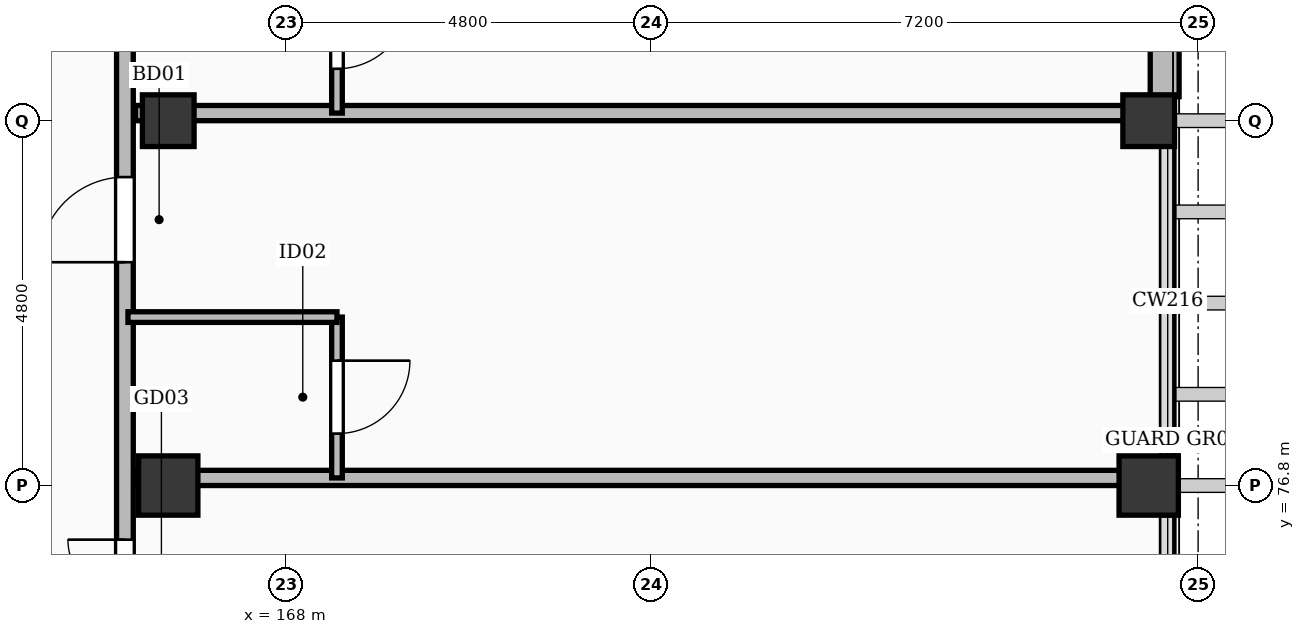
"""IFC4 building model, lengths in metres.
Left out: names, types, materials, properties, quantities, classifications, styles, units other than length and angle.
Written with IfcOpenShell. Run it as: python <this file> out.ifc"""

import sys

from ifc_helpers import new_model, si_unit, direction, frame, frame_2d, origin, origin_2d, place, context, subcontext, project, spatial, rectangle, extrude, element, fill, save


model = new_model("IFC4")
c1 = context("Model", 3, precision=1e-05, world=origin(), true_north=direction((0.0, 1.0)))
c2 = subcontext(c1, "Body", "Model", "MODEL_VIEW")
j1 = project(units=[si_unit("LENGTHUNIT", "METRE"), si_unit("PLANEANGLEUNIT", "RADIAN")], contexts=[c1])
p1 = place(None, origin())
s1 = spatial("IfcSite", under=j1, at=p1, CompositionType="ELEMENT")
p2 = place(p1, origin())
s2 = spatial("IfcBuilding", under=s1, at=p2, CompositionType="ELEMENT")
p3 = place(p2, frame((0.0, 0.0, 24.6)))
s3 = spatial("IfcBuildingStorey", under=s2, at=p3, CompositionType="ELEMENT", Elevation=24.6)
for number, where, z_axis, x_axis in (
    (1, (166.45, 76.8, 0.0), (0.0, 0.0, 1.0), (1.0, 0.0, 0.0)),
    (2, (179.35, 76.8, 0.0), (0.0, 0.0, 1.0), (1.0, 0.0, 0.0)),
):
    element("IfcColumn", number, at=place(p3, frame(where, z_axis=z_axis, x_axis=x_axis)), inside=s3, PredefinedType="COLUMN", context=c2, shape_type="SweptSolid", body=[
        extrude(rectangle(XDim=0.78, YDim=0.78, at=origin_2d()), origin(), (0.0, 0.0, 1.0), 3.6),
    ])
for number, where, z_axis, x_axis in (
    (3, (166.45, 81.6, 0.0), (0.0, 0.0, 1.0), (1.0, 0.0, 0.0)),
    (4, (179.35, 81.6, 0.0), (0.0, 0.0, 1.0), (1.0, 0.0, 0.0)),
):
    element("IfcColumn", number, at=place(p3, frame(where, z_axis=z_axis, x_axis=x_axis)), inside=s3, PredefinedType="COLUMN", context=c2, shape_type="SweptSolid", body=[
        extrude(rectangle(XDim=0.68, YDim=0.68, at=origin_2d()), origin(), (0.0, 0.0, 1.0), 3.6),
    ])
p4 = place(p3, frame((179.56, 86.035, 0.0), z_axis=(0.0, 0.0, 1.0), x_axis=(0.0, -1.0, 0.0)))
e5 = element("IfcWall", 5, at=p4, inside=s3, PredefinedType="SOLIDWALL", context=c2, shape_type="SweptSolid", body=[
    extrude(rectangle(XDim=4.12, YDim=0.38, at=frame_2d((2.06, 0.0))), origin(), (0.0, 0.0, 1.0), 2.582),
])
p5 = place(p4, frame((1.235, 0.0, 0.55)))
e6 = element("IfcOpeningElement", 6, at=p5, cuts=e5, PredefinedType="OPENING", context=c2, shape_type="SweptSolid", body=[
    extrude(rectangle(XDim=1.65, YDim=1.75, at=frame_2d((0.825, 0.875))), frame((0.0, 0.202, 0.0), z_axis=(0.0, -1.0, 0.0), x_axis=(1.0, 0.0, 0.0)), (0.0, 0.0, 1.0), 0.404),
])
p6 = place(p3, frame((165.88, 65.4, 0.0), z_axis=(0.0, 0.0, 1.0), x_axis=(0.0, 1.0, 0.0)))
e7 = element("IfcWall", 7, at=p6, inside=s3, PredefinedType="PARTITIONING", context=c2, shape_type="SweptSolid", body=[
    extrude(rectangle(XDim=60.25, YDim=0.22, at=frame_2d((30.125, 0.0))), origin(), (0.0, 0.0, 1.0), 2.582),
])
p7 = place(p6, frame((4.738, 0.0, 0.0)))
e8 = element("IfcOpeningElement", 8, at=p7, cuts=e7, PredefinedType="OPENING", context=c2, shape_type="SweptSolid", body=[
    extrude(rectangle(XDim=1.02, YDim=2.2, at=frame_2d((0.51, 1.1))), frame((0.0, 0.122, 0.0), z_axis=(0.0, -1.0, 0.0), x_axis=(1.0, 0.0, 0.0)), (0.0, 0.0, 1.0), 0.244),
])
p8 = place(p6, frame((9.188, 0.0, 0.0)))
e9 = element("IfcOpeningElement", 9, at=p8, cuts=e7, PredefinedType="OPENING", context=c2, shape_type="SweptSolid", body=[
    extrude(rectangle(XDim=1.5, YDim=2.3, at=frame_2d((0.75, 1.15))), frame((0.0, 0.122, 0.0), z_axis=(0.0, -1.0, 0.0), x_axis=(1.0, 0.0, 0.0)), (0.0, 0.0, 1.0), 0.244),
])
p9 = place(p6, frame((14.338, 0.0, 0.0)))
e10 = element("IfcOpeningElement", 10, at=p9, cuts=e7, PredefinedType="OPENING", context=c2, shape_type="SweptSolid", body=[
    extrude(rectangle(XDim=1.12, YDim=2.15, at=frame_2d((0.56, 1.075))), frame((0.0, 0.122, 0.0), z_axis=(0.0, -1.0, 0.0), x_axis=(1.0, 0.0, 0.0)), (0.0, 0.0, 1.0), 0.244),
])
p10 = place(p6, frame((18.788, 0.0, 0.0)))
e11 = element("IfcOpeningElement", 11, at=p10, cuts=e7, PredefinedType="OPENING", context=c2, shape_type="SweptSolid", body=[
    extrude(rectangle(XDim=1.28, YDim=2.16, at=frame_2d((0.64, 1.08))), frame((0.0, 0.122, 0.0), z_axis=(0.0, -1.0, 0.0), x_axis=(1.0, 0.0, 0.0)), (0.0, 0.0, 1.0), 0.244),
])
p11 = place(p6, frame((23.938, 0.0, 0.0)))
e12 = element("IfcOpeningElement", 12, at=p11, cuts=e7, PredefinedType="OPENING", context=c2, shape_type="SweptSolid", body=[
    extrude(rectangle(XDim=1.05, YDim=2.18, at=frame_2d((0.525, 1.09))), frame((0.0, 0.122, 0.0), z_axis=(0.0, -1.0, 0.0), x_axis=(1.0, 0.0, 0.0)), (0.0, 0.0, 1.0), 0.244),
])
p12 = place(p6, frame((28.738, 0.0, 0.0)))
e13 = element("IfcOpeningElement", 13, at=p12, cuts=e7, PredefinedType="OPENING", context=c2, shape_type="SweptSolid", body=[
    extrude(rectangle(XDim=1.08, YDim=2.25, at=frame_2d((0.54, 1.125))), frame((0.0, 0.122, 0.0), z_axis=(0.0, -1.0, 0.0), x_axis=(1.0, 0.0, 0.0)), (0.0, 0.0, 1.0), 0.244),
])
p13 = place(p6, frame((33.538, 0.0, 0.0)))
e14 = element("IfcOpeningElement", 14, at=p13, cuts=e7, PredefinedType="OPENING", context=c2, shape_type="SweptSolid", body=[
    extrude(rectangle(XDim=1.02, YDim=2.2, at=frame_2d((0.51, 1.1))), frame((0.0, 0.122, 0.0), z_axis=(0.0, -1.0, 0.0), x_axis=(1.0, 0.0, 0.0)), (0.0, 0.0, 1.0), 0.244),
])
p14 = place(p6, frame((37.988, 0.0, 0.0)))
e15 = element("IfcOpeningElement", 15, at=p14, cuts=e7, PredefinedType="OPENING", context=c2, shape_type="SweptSolid", body=[
    extrude(rectangle(XDim=1.5, YDim=2.3, at=frame_2d((0.75, 1.15))), frame((0.0, 0.122, 0.0), z_axis=(0.0, -1.0, 0.0), x_axis=(1.0, 0.0, 0.0)), (0.0, 0.0, 1.0), 0.244),
])
p15 = place(p6, frame((43.138, 0.0, 0.0)))
e16 = element("IfcOpeningElement", 16, at=p15, cuts=e7, PredefinedType="OPENING", context=c2, shape_type="SweptSolid", body=[
    extrude(rectangle(XDim=1.12, YDim=2.15, at=frame_2d((0.56, 1.075))), frame((0.0, 0.122, 0.0), z_axis=(0.0, -1.0, 0.0), x_axis=(1.0, 0.0, 0.0)), (0.0, 0.0, 1.0), 0.244),
])
p16 = place(p6, frame((47.588, 0.0, 0.0)))
e17 = element("IfcOpeningElement", 17, at=p16, cuts=e7, PredefinedType="OPENING", context=c2, shape_type="SweptSolid", body=[
    extrude(rectangle(XDim=1.28, YDim=2.16, at=frame_2d((0.64, 1.08))), frame((0.0, 0.122, 0.0), z_axis=(0.0, -1.0, 0.0), x_axis=(1.0, 0.0, 0.0)), (0.0, 0.0, 1.0), 0.244),
])
p17 = place(p6, frame((52.738, 0.0, 0.0)))
e18 = element("IfcOpeningElement", 18, at=p17, cuts=e7, PredefinedType="OPENING", context=c2, shape_type="SweptSolid", body=[
    extrude(rectangle(XDim=1.05, YDim=2.18, at=frame_2d((0.525, 1.09))), frame((0.0, 0.122, 0.0), z_axis=(0.0, -1.0, 0.0), x_axis=(1.0, 0.0, 0.0)), (0.0, 0.0, 1.0), 0.244),
])
p18 = place(p6, frame((57.538, 0.0, 0.0)))
e19 = element("IfcOpeningElement", 19, at=p18, cuts=e7, PredefinedType="OPENING", context=c2, shape_type="SweptSolid", body=[
    extrude(rectangle(XDim=1.08, YDim=2.25, at=frame_2d((0.54, 1.125))), frame((0.0, 0.122, 0.0), z_axis=(0.0, -1.0, 0.0), x_axis=(1.0, 0.0, 0.0)), (0.0, 0.0, 1.0), 0.244),
])
p19 = place(p3, frame((166.02, 76.9, 0.0), z_axis=(0.0, 0.0, 1.0), x_axis=(1.0, 0.0, 0.0)))
e20 = element("IfcWall", 20, at=p19, inside=s3, PredefinedType="PARTITIONING", context=c2, shape_type="SweptSolid", body=[
    extrude(rectangle(XDim=13.23, YDim=0.2, at=frame_2d((6.615, 0.0))), origin(), (0.0, 0.0, 1.0), 2.582),
])
p20 = place(p3, frame((168.67, 76.9, 0.0), z_axis=(0.0, 0.0, 1.0), x_axis=(0.0, 1.0, 0.0)))
e21 = element("IfcWall", 21, at=p20, inside=s3, PredefinedType="PARTITIONING", context=c2, shape_type="SweptSolid", body=[
    extrude(rectangle(XDim=2.116, YDim=0.14, at=frame_2d((1.058, 0.0))), origin(), (0.0, 0.0, 1.0), 2.632),
])
p21 = place(p20, frame((0.583, 0.0, 0.0)))
e22 = element("IfcOpeningElement", 22, at=p21, cuts=e21, PredefinedType="OPENING", context=c2, shape_type="SweptSolid", body=[
    extrude(rectangle(XDim=0.96, YDim=2.12, at=frame_2d((0.48, 1.06))), frame((0.0, 0.082, 0.0), z_axis=(0.0, -1.0, 0.0), x_axis=(1.0, 0.0, 0.0)), (0.0, 0.0, 1.0), 0.164),
])
p22 = place(p3, frame((165.92, 79.016, 0.0), z_axis=(0.0, 0.0, 1.0), x_axis=(1.0, 0.0, 0.0)))
e23 = element("IfcWall", 23, at=p22, inside=s3, PredefinedType="PARTITIONING", context=c2, shape_type="SweptSolid", body=[
    extrude(rectangle(XDim=2.75, YDim=0.14, at=frame_2d((1.375, 0.0))), origin(), (0.0, 0.0, 1.0), 2.632),
])
p23 = place(p3, frame((166.02, 81.7, 0.0), z_axis=(0.0, 0.0, 1.0), x_axis=(1.0, 0.0, 0.0)))
e24 = element("IfcWall", 24, at=p23, inside=s3, PredefinedType="PARTITIONING", context=c2, shape_type="SweptSolid", body=[
    extrude(rectangle(XDim=13.23, YDim=0.2, at=frame_2d((6.615, 0.0))), origin(), (0.0, 0.0, 1.0), 2.582),
])
p24 = place(p3, frame((168.67, 81.7, 0.0), z_axis=(0.0, 0.0, 1.0), x_axis=(0.0, 1.0, 0.0)))
e25 = element("IfcWall", 25, at=p24, inside=s3, PredefinedType="PARTITIONING", context=c2, shape_type="SweptSolid", body=[
    extrude(rectangle(XDim=2.116, YDim=0.14, at=frame_2d((1.058, 0.0))), origin(), (0.0, 0.0, 1.0), 2.632),
])
p25 = place(p24, frame((0.583, 0.0, 0.0)))
e26 = element("IfcOpeningElement", 26, at=p25, cuts=e25, PredefinedType="OPENING", context=c2, shape_type="SweptSolid", body=[
    extrude(rectangle(XDim=0.96, YDim=2.12, at=frame_2d((0.48, 1.06))), frame((0.0, 0.082, 0.0), z_axis=(0.0, -1.0, 0.0), x_axis=(1.0, 0.0, 0.0)), (0.0, 0.0, 1.0), 0.164),
])
p26 = place(p8, origin())
e27 = element("IfcDoor", 27, at=p26, inside=s3, OperationType="DOUBLE_DOOR_SINGLE_SWING", PredefinedType="DOOR", context=c2, shape_type="SweptSolid", body=[
    extrude(rectangle(XDim=1.5, YDim=2.3, at=frame_2d((0.75, 1.15))), frame((0.0, 0.025, 0.0), z_axis=(0.0, -1.0, 0.0), x_axis=(1.0, 0.0, 0.0)), (0.0, 0.0, 1.0), 0.05),
])
fill(e9, e27)
p27 = place(p9, origin())
e28 = element("IfcDoor", 28, at=p27, inside=s3, OperationType="SINGLE_SWING_LEFT", PredefinedType="DOOR", context=c2, shape_type="SweptSolid", body=[
    extrude(rectangle(XDim=1.12, YDim=2.15, at=frame_2d((0.56, 1.075))), frame((0.0, 0.025, 0.0), z_axis=(0.0, -1.0, 0.0), x_axis=(1.0, 0.0, 0.0)), (0.0, 0.0, 1.0), 0.05),
])
fill(e10, e28)
p28 = place(p21, frame((0.96, 0.0, 0.0), z_axis=(0.0, 0.0, 1.0), x_axis=(-1.0, 0.0, 0.0)))
e29 = element("IfcDoor", 29, at=p28, inside=s3, OperationType="SINGLE_SWING_RIGHT", PredefinedType="DOOR", context=c2, shape_type="SweptSolid", body=[
    extrude(rectangle(XDim=0.96, YDim=2.12, at=frame_2d((0.48, 1.06))), frame((0.0, 0.025, 0.0), z_axis=(0.0, -1.0, 0.0), x_axis=(1.0, 0.0, 0.0)), (0.0, 0.0, 1.0), 0.05),
])
fill(e22, e29)
p29 = place(p25, frame((0.96, 0.0, 0.0), z_axis=(0.0, 0.0, 1.0), x_axis=(-1.0, 0.0, 0.0)))
e30 = element("IfcDoor", 30, at=p29, inside=s3, OperationType="SINGLE_SWING_RIGHT", PredefinedType="DOOR", context=c2, shape_type="SweptSolid", body=[
    extrude(rectangle(XDim=0.96, YDim=2.12, at=frame_2d((0.48, 1.06))), frame((0.0, 0.025, 0.0), z_axis=(0.0, -1.0, 0.0), x_axis=(1.0, 0.0, 0.0)), (0.0, 0.0, 1.0), 0.05),
])
fill(e26, e30)
save(model, sys.argv[1])
